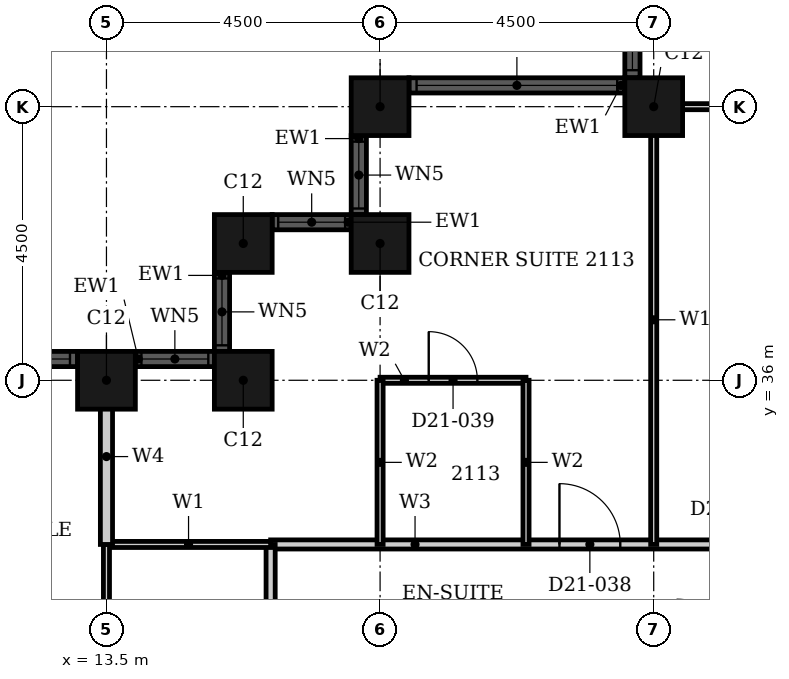
"""IFC4 building model, lengths in metres.
Left out: names, types, materials, properties, quantities, classifications, styles, units other than length and angle.
Written with IfcOpenShell. Run it as: python <this file> out.ifc"""

import sys

from ifc_helpers import new_model, si_unit, direction, frame, frame_2d, origin, origin_2d, place, context, subcontext, project, spatial, rectangle, hollow_rectangle, extrude, element, fill, save


model = new_model("IFC4")
c1 = context("Model", 3, precision=1e-05, world=origin(), true_north=direction((0.0, 1.0)))
c2 = subcontext(c1, "Body", "Model", "MODEL_VIEW")
j1 = project(units=[si_unit("LENGTHUNIT", "METRE"), si_unit("PLANEANGLEUNIT", "RADIAN")], contexts=[c1])
p1 = place(None, origin())
s1 = spatial("IfcSite", under=j1, at=p1, CompositionType="ELEMENT")
p2 = place(p1, origin())
s2 = spatial("IfcBuilding", under=s1, at=p2, CompositionType="ELEMENT")
p3 = place(p2, frame((0.0, 0.0, 88.8)))
s3 = spatial("IfcBuildingStorey", under=s2, at=p3, CompositionType="ELEMENT", Elevation=88.8)
for number, where, z_axis, x_axis in (
    (1, (22.5, 40.5, 0.0), (0.0, 0.0, 1.0), (1.0, 0.0, 0.0)),
    (2, (18.0, 40.5, 0.0), (0.0, 0.0, 1.0), (1.0, 0.0, 0.0)),
    (3, (18.0, 38.25, 0.0), (0.0, 0.0, 1.0), (1.0, 0.0, 0.0)),
    (4, (15.75, 38.25, 0.0), (0.0, 0.0, 1.0), (1.0, 0.0, 0.0)),
    (5, (15.75, 36.0, 0.0), (0.0, 0.0, 1.0), (1.0, 0.0, 0.0)),
    (6, (13.5, 36.0, 0.0), (0.0, 0.0, 1.0), (1.0, 0.0, 0.0)),
):
    element("IfcColumn", number, at=place(p3, frame(where, z_axis=z_axis, x_axis=x_axis)), inside=s3, PredefinedType="COLUMN", context=c2, shape_type="SweptSolid", body=[
        extrude(hollow_rectangle(XDim=0.95, YDim=0.95, WallThickness=0.03, at=origin_2d()), origin(), (0.0, 0.0, 1.0), 3.6),
    ])
p4 = place(p3, frame((22.15, 49.025, 0.0), z_axis=(0.0, 0.0, 1.0), x_axis=(0.0, -1.0, 0.0)))
e7 = element("IfcWall", 7, at=p4, inside=s3, PredefinedType="SOLIDWALL", context=c2, shape_type="SweptSolid", body=[
    extrude(rectangle(XDim=8.05, YDim=0.25, at=frame_2d((4.025, 0.0))), origin(), (0.0, 0.0, 1.0), 3.6),
])
p5 = place(p4, frame((0.125, 0.0, 0.9)))
e8 = element("IfcOpeningElement", 8, at=p5, cuts=e7, PredefinedType="OPENING", context=c2, shape_type="SweptSolid", body=[
    extrude(rectangle(XDim=3.3, YDim=2.08, at=frame_2d((1.65, 1.04))), frame((0.0, 0.135, 0.0), z_axis=(0.0, -1.0, 0.0), x_axis=(1.0, 0.0, 0.0)), (0.0, 0.0, 1.0), 0.27),
])
p6 = place(p4, frame((4.625, 0.0, 0.9)))
e9 = element("IfcOpeningElement", 9, at=p6, cuts=e7, PredefinedType="OPENING", context=c2, shape_type="SweptSolid", body=[
    extrude(rectangle(XDim=3.3, YDim=2.08, at=frame_2d((1.65, 1.04))), frame((0.0, 0.135, 0.0), z_axis=(0.0, -1.0, 0.0), x_axis=(1.0, 0.0, 0.0)), (0.0, 0.0, 1.0), 0.27),
])
p7 = place(p3, frame((22.025, 40.85, 0.0), z_axis=(0.0, 0.0, 1.0), x_axis=(-1.0, 0.0, 0.0)))
e10 = element("IfcWall", 10, at=p7, inside=s3, PredefinedType="SOLIDWALL", context=c2, shape_type="SweptSolid", body=[
    extrude(rectangle(XDim=3.55, YDim=0.25, at=frame_2d((1.775, 0.0))), origin(), (0.0, 0.0, 1.0), 3.6),
])
p8 = place(p7, frame((0.125, 0.0, 0.9)))
e11 = element("IfcOpeningElement", 11, at=p8, cuts=e10, PredefinedType="OPENING", context=c2, shape_type="SweptSolid", body=[
    extrude(rectangle(XDim=3.3, YDim=2.08, at=frame_2d((1.65, 1.04))), frame((0.0, 0.135, 0.0), z_axis=(0.0, -1.0, 0.0), x_axis=(1.0, 0.0, 0.0)), (0.0, 0.0, 1.0), 0.27),
])
p9 = place(p3, frame((17.65, 40.025, 0.0), z_axis=(0.0, 0.0, 1.0), x_axis=(0.0, -1.0, 0.0)))
e12 = element("IfcWall", 12, at=p9, inside=s3, PredefinedType="SOLIDWALL", context=c2, shape_type="SweptSolid", body=[
    extrude(rectangle(XDim=1.3, YDim=0.25, at=frame_2d((0.65, 0.0))), origin(), (0.0, 0.0, 1.0), 3.6),
])
p10 = place(p9, frame((0.1, 0.0, 0.9)))
e13 = element("IfcOpeningElement", 13, at=p10, cuts=e12, PredefinedType="OPENING", context=c2, shape_type="SweptSolid", body=[
    extrude(rectangle(XDim=1.1, YDim=2.08, at=frame_2d((0.55, 1.04))), frame((0.0, 0.135, 0.0), z_axis=(0.0, -1.0, 0.0), x_axis=(1.0, 0.0, 0.0)), (0.0, 0.0, 1.0), 0.27),
])
p11 = place(p3, frame((17.525, 38.6, 0.0), z_axis=(0.0, 0.0, 1.0), x_axis=(-1.0, 0.0, 0.0)))
e14 = element("IfcWall", 14, at=p11, inside=s3, PredefinedType="SOLIDWALL", context=c2, shape_type="SweptSolid", body=[
    extrude(rectangle(XDim=1.3, YDim=0.25, at=frame_2d((0.65, 0.0))), origin(), (0.0, 0.0, 1.0), 3.6),
])
p12 = place(p11, frame((0.1, 0.0, 0.9)))
e15 = element("IfcOpeningElement", 15, at=p12, cuts=e14, PredefinedType="OPENING", context=c2, shape_type="SweptSolid", body=[
    extrude(rectangle(XDim=1.1, YDim=2.08, at=frame_2d((0.55, 1.04))), frame((0.0, 0.135, 0.0), z_axis=(0.0, -1.0, 0.0), x_axis=(1.0, 0.0, 0.0)), (0.0, 0.0, 1.0), 0.27),
])
p13 = place(p3, frame((15.4, 37.775, 0.0), z_axis=(0.0, 0.0, 1.0), x_axis=(0.0, -1.0, 0.0)))
e16 = element("IfcWall", 16, at=p13, inside=s3, PredefinedType="SOLIDWALL", context=c2, shape_type="SweptSolid", body=[
    extrude(rectangle(XDim=1.3, YDim=0.25, at=frame_2d((0.65, 0.0))), origin(), (0.0, 0.0, 1.0), 3.6),
])
p14 = place(p13, frame((0.1, 0.0, 0.9)))
e17 = element("IfcOpeningElement", 17, at=p14, cuts=e16, PredefinedType="OPENING", context=c2, shape_type="SweptSolid", body=[
    extrude(rectangle(XDim=1.1, YDim=2.08, at=frame_2d((0.55, 1.04))), frame((0.0, 0.135, 0.0), z_axis=(0.0, -1.0, 0.0), x_axis=(1.0, 0.0, 0.0)), (0.0, 0.0, 1.0), 0.27),
])
p15 = place(p3, frame((15.275, 36.35, 0.0), z_axis=(0.0, 0.0, 1.0), x_axis=(-1.0, 0.0, 0.0)))
e18 = element("IfcWall", 18, at=p15, inside=s3, PredefinedType="SOLIDWALL", context=c2, shape_type="SweptSolid", body=[
    extrude(rectangle(XDim=1.3, YDim=0.25, at=frame_2d((0.65, 0.0))), origin(), (0.0, 0.0, 1.0), 3.6),
])
p16 = place(p15, frame((0.1, 0.0, 0.9)))
e19 = element("IfcOpeningElement", 19, at=p16, cuts=e18, PredefinedType="OPENING", context=c2, shape_type="SweptSolid", body=[
    extrude(rectangle(XDim=1.1, YDim=2.08, at=frame_2d((0.55, 1.04))), frame((0.0, 0.135, 0.0), z_axis=(0.0, -1.0, 0.0), x_axis=(1.0, 0.0, 0.0)), (0.0, 0.0, 1.0), 0.27),
])
p17 = place(p3, frame((13.025, 36.35, 0.0), z_axis=(0.0, 0.0, 1.0), x_axis=(-1.0, 0.0, 0.0)))
e20 = element("IfcWall", 20, at=p17, inside=s3, PredefinedType="SOLIDWALL", context=c2, shape_type="SweptSolid", body=[
    extrude(rectangle(XDim=8.05, YDim=0.25, at=frame_2d((4.025, 0.0))), origin(), (0.0, 0.0, 1.0), 3.6),
])
p18 = place(p17, frame((0.125, 0.0, 0.9)))
e21 = element("IfcOpeningElement", 21, at=p18, cuts=e20, PredefinedType="OPENING", context=c2, shape_type="SweptSolid", body=[
    extrude(rectangle(XDim=3.3, YDim=2.08, at=frame_2d((1.65, 1.04))), frame((0.0, 0.135, 0.0), z_axis=(0.0, -1.0, 0.0), x_axis=(1.0, 0.0, 0.0)), (0.0, 0.0, 1.0), 0.27),
])
p19 = place(p17, frame((4.625, 0.0, 0.9)))
e22 = element("IfcOpeningElement", 22, at=p19, cuts=e20, PredefinedType="OPENING", context=c2, shape_type="SweptSolid", body=[
    extrude(rectangle(XDim=3.3, YDim=2.08, at=frame_2d((1.65, 1.04))), frame((0.0, 0.135, 0.0), z_axis=(0.0, -1.0, 0.0), x_axis=(1.0, 0.0, 0.0)), (0.0, 0.0, 1.0), 0.27),
])
p20 = place(p3, frame((16.2, 33.3, 0.0), z_axis=(0.0, 0.0, 1.0), x_axis=(1.0, 0.0, 0.0)))
e23 = element("IfcWall", 23, at=p20, inside=s3, PredefinedType="PARTITIONING", context=c2, shape_type="SweptSolid", body=[
    extrude(rectangle(XDim=15.3, YDim=0.15, at=frame_2d((7.65, 0.0))), origin(), (0.0, 0.0, 1.0), 3.3),
])
p21 = place(p20, frame((4.75, 0.0, 0.0)))
e24 = element("IfcOpeningElement", 24, at=p21, cuts=e23, PredefinedType="OPENING", context=c2, shape_type="SweptSolid", body=[
    extrude(rectangle(XDim=1.0, YDim=2.1, at=frame_2d((0.5, 1.05))), frame((0.0, 0.085, 0.0), z_axis=(0.0, -1.0, 0.0), x_axis=(1.0, 0.0, 0.0)), (0.0, 0.0, 1.0), 0.17),
])
p22 = place(p20, frame((10.35, 0.0, 0.0)))
e25 = element("IfcOpeningElement", 25, at=p22, cuts=e23, PredefinedType="OPENING", context=c2, shape_type="SweptSolid", body=[
    extrude(rectangle(XDim=0.9, YDim=2.1, at=frame_2d((0.45, 1.05))), frame((0.0, 0.085, 0.0), z_axis=(0.0, -1.0, 0.0), x_axis=(1.0, 0.0, 0.0)), (0.0, 0.0, 1.0), 0.17),
])
p23 = place(p3, frame((16.2, 27.0, 0.0), z_axis=(0.0, 0.0, 1.0), x_axis=(0.0, 1.0, 0.0)))
e26 = element("IfcWall", 26, at=p23, inside=s3, PredefinedType="PARTITIONING", context=c2, shape_type="SweptSolid", body=[
    extrude(rectangle(XDim=6.3, YDim=0.15, at=frame_2d((3.15, 0.0))), origin(), (0.0, 0.0, 1.0), 3.3),
])
p24 = place(p23, frame((2.525, 0.0, 0.0)))
e27 = element("IfcOpeningElement", 27, at=p24, cuts=e26, PredefinedType="OPENING", context=c2, shape_type="SweptSolid", body=[
    extrude(rectangle(XDim=0.95, YDim=2.1, at=frame_2d((0.475, 1.05))), frame((0.0, 0.085, 0.0), z_axis=(0.0, -1.0, 0.0), x_axis=(1.0, 0.0, 0.0)), (0.0, 0.0, 1.0), 0.17),
])
p25 = place(p3, frame((13.5, 33.3, 0.0), z_axis=(0.0, 0.0, 1.0), x_axis=(1.0, 0.0, 0.0)))
e28 = element("IfcWall", 28, at=p25, inside=s3, PredefinedType="PARTITIONING", context=c2, shape_type="SweptSolid", body=[
    extrude(rectangle(XDim=2.7, YDim=0.1, at=frame_2d((1.35, 0.0))), origin(), (0.0, 0.0, 1.0), 3.3),
])
p26 = place(p3, frame((22.31, 40.5, 0.0), z_axis=(0.0, 0.0, 1.0), x_axis=(1.0, 0.0, 0.0)))
e29 = element("IfcWall", 29, at=p26, inside=s3, PredefinedType="PARTITIONING", context=c2, shape_type="SweptSolid", body=[
    extrude(rectangle(XDim=9.19, YDim=0.1, at=frame_2d((4.595, 0.0))), origin(), (0.0, 0.0, 1.0), 2.38),
])
p27 = place(p3, frame((13.5, 27.0, 0.0), z_axis=(0.0, 0.0, 1.0), x_axis=(0.0, 1.0, 0.0)))
e30 = element("IfcWall", 30, at=p27, inside=s3, PredefinedType="PARTITIONING", context=c2, shape_type="SweptSolid", body=[
    extrude(rectangle(XDim=6.3, YDim=0.1, at=frame_2d((3.15, 0.0))), origin(), (0.0, 0.0, 1.0), 2.38),
])
p28 = place(p3, frame((22.5, 33.3, 0.0), z_axis=(0.0, 0.0, 1.0), x_axis=(0.0, 1.0, 0.0)))
e31 = element("IfcWall", 31, at=p28, inside=s3, PredefinedType="PARTITIONING", context=c2, shape_type="SweptSolid", body=[
    extrude(rectangle(XDim=7.39, YDim=0.1, at=frame_2d((3.695, 0.0))), origin(), (0.0, 0.0, 1.0), 3.3),
])
p29 = place(p3, frame((13.5, 33.3, 0.0), z_axis=(0.0, 0.0, 1.0), x_axis=(0.0, 1.0, 0.0)))
e32 = element("IfcWall", 32, at=p29, inside=s3, PredefinedType="PARTITIONING", context=c2, shape_type="SweptSolid", body=[
    extrude(rectangle(XDim=2.89, YDim=0.2, at=frame_2d((1.445, 0.0))), origin(), (0.0, 0.0, 1.0), 2.38),
])
p30 = place(p3, frame((18.0, 36.0, 0.0), z_axis=(0.0, 0.0, 1.0), x_axis=(1.0, 0.0, 0.0)))
e33 = element("IfcWall", 33, at=p30, inside=s3, PredefinedType="PARTITIONING", context=c2, shape_type="SweptSolid", body=[
    extrude(rectangle(XDim=2.4, YDim=0.1, at=frame_2d((1.2, 0.0))), origin(), (0.0, 0.0, 1.0), 3.3),
])
p31 = place(p30, frame((0.8, 0.0, 0.0)))
e34 = element("IfcOpeningElement", 34, at=p31, cuts=e33, PredefinedType="OPENING", context=c2, shape_type="SweptSolid", body=[
    extrude(rectangle(XDim=0.8, YDim=2.1, at=frame_2d((0.4, 1.05))), frame((0.0, 0.06, 0.0), z_axis=(0.0, -1.0, 0.0), x_axis=(1.0, 0.0, 0.0)), (0.0, 0.0, 1.0), 0.12),
])
for number, where, z_axis, x_axis in (
    (35, (18.0, 33.3, 0.0), (0.0, 0.0, 1.0), (0.0, 1.0, 0.0)),
    (36, (20.4, 33.3, 0.0), (0.0, 0.0, 1.0), (0.0, 1.0, 0.0)),
):
    element("IfcWall", number, at=place(p3, frame(where, z_axis=z_axis, x_axis=x_axis)), inside=s3, PredefinedType="PARTITIONING", context=c2, shape_type="SweptSolid", body=[
        extrude(rectangle(XDim=2.7, YDim=0.1, at=frame_2d((1.35, 0.0))), origin(), (0.0, 0.0, 1.0), 3.3),
    ])
p32 = place(p6, origin())
e37 = element("IfcWindow", 37, at=p32, inside=s3, PartitioningType="SINGLE_PANEL", PredefinedType="WINDOW", context=c2, shape_type="SweptSolid", body=[
    extrude(rectangle(XDim=3.3, YDim=2.08, at=frame_2d((1.65, 1.04))), frame((0.0, 0.03, 0.0), z_axis=(0.0, -1.0, 0.0), x_axis=(1.0, 0.0, 0.0)), (0.0, 0.0, 1.0), 0.06),
])
fill(e9, e37)
p33 = place(p8, origin())
e38 = element("IfcWindow", 38, at=p33, inside=s3, PartitioningType="SINGLE_PANEL", PredefinedType="WINDOW", context=c2, shape_type="SweptSolid", body=[
    extrude(rectangle(XDim=3.3, YDim=2.08, at=frame_2d((1.65, 1.04))), frame((0.0, 0.03, 0.0), z_axis=(0.0, -1.0, 0.0), x_axis=(1.0, 0.0, 0.0)), (0.0, 0.0, 1.0), 0.06),
])
fill(e11, e38)
p34 = place(p10, origin())
e39 = element("IfcWindow", 39, at=p34, inside=s3, PartitioningType="SINGLE_PANEL", PredefinedType="WINDOW", context=c2, shape_type="SweptSolid", body=[
    extrude(rectangle(XDim=1.1, YDim=2.08, at=frame_2d((0.55, 1.04))), frame((0.0, 0.03, 0.0), z_axis=(0.0, -1.0, 0.0), x_axis=(1.0, 0.0, 0.0)), (0.0, 0.0, 1.0), 0.06),
])
fill(e13, e39)
p35 = place(p12, origin())
e40 = element("IfcWindow", 40, at=p35, inside=s3, PartitioningType="SINGLE_PANEL", PredefinedType="WINDOW", context=c2, shape_type="SweptSolid", body=[
    extrude(rectangle(XDim=1.1, YDim=2.08, at=frame_2d((0.55, 1.04))), frame((0.0, 0.03, 0.0), z_axis=(0.0, -1.0, 0.0), x_axis=(1.0, 0.0, 0.0)), (0.0, 0.0, 1.0), 0.06),
])
fill(e15, e40)
p36 = place(p14, origin())
e41 = element("IfcWindow", 41, at=p36, inside=s3, PartitioningType="SINGLE_PANEL", PredefinedType="WINDOW", context=c2, shape_type="SweptSolid", body=[
    extrude(rectangle(XDim=1.1, YDim=2.08, at=frame_2d((0.55, 1.04))), frame((0.0, 0.03, 0.0), z_axis=(0.0, -1.0, 0.0), x_axis=(1.0, 0.0, 0.0)), (0.0, 0.0, 1.0), 0.06),
])
fill(e17, e41)
p37 = place(p16, origin())
e42 = element("IfcWindow", 42, at=p37, inside=s3, PartitioningType="SINGLE_PANEL", PredefinedType="WINDOW", context=c2, shape_type="SweptSolid", body=[
    extrude(rectangle(XDim=1.1, YDim=2.08, at=frame_2d((0.55, 1.04))), frame((0.0, 0.03, 0.0), z_axis=(0.0, -1.0, 0.0), x_axis=(1.0, 0.0, 0.0)), (0.0, 0.0, 1.0), 0.06),
])
fill(e19, e42)
p38 = place(p18, origin())
e43 = element("IfcWindow", 43, at=p38, inside=s3, PartitioningType="SINGLE_PANEL", PredefinedType="WINDOW", context=c2, shape_type="SweptSolid", body=[
    extrude(rectangle(XDim=3.3, YDim=2.08, at=frame_2d((1.65, 1.04))), frame((0.0, 0.03, 0.0), z_axis=(0.0, -1.0, 0.0), x_axis=(1.0, 0.0, 0.0)), (0.0, 0.0, 1.0), 0.06),
])
fill(e21, e43)
p39 = place(p21, origin())
e44 = element("IfcDoor", 44, at=p39, inside=s3, OperationType="SINGLE_SWING_RIGHT", PredefinedType="DOOR", context=c2, shape_type="SweptSolid", body=[
    extrude(rectangle(XDim=1.0, YDim=2.1, at=frame_2d((0.5, 1.05))), frame((0.0, 0.025, 0.0), z_axis=(0.0, -1.0, 0.0), x_axis=(1.0, 0.0, 0.0)), (0.0, 0.0, 1.0), 0.05),
])
fill(e24, e44)
p40 = place(p31, origin())
e45 = element("IfcDoor", 45, at=p40, inside=s3, OperationType="SINGLE_SWING_RIGHT", PredefinedType="DOOR", context=c2, shape_type="SweptSolid", body=[
    extrude(rectangle(XDim=0.8, YDim=2.1, at=frame_2d((0.4, 1.05))), frame((0.0, 0.025, 0.0), z_axis=(0.0, -1.0, 0.0), x_axis=(1.0, 0.0, 0.0)), (0.0, 0.0, 1.0), 0.05),
])
fill(e34, e45)
save(model, sys.argv[1])
